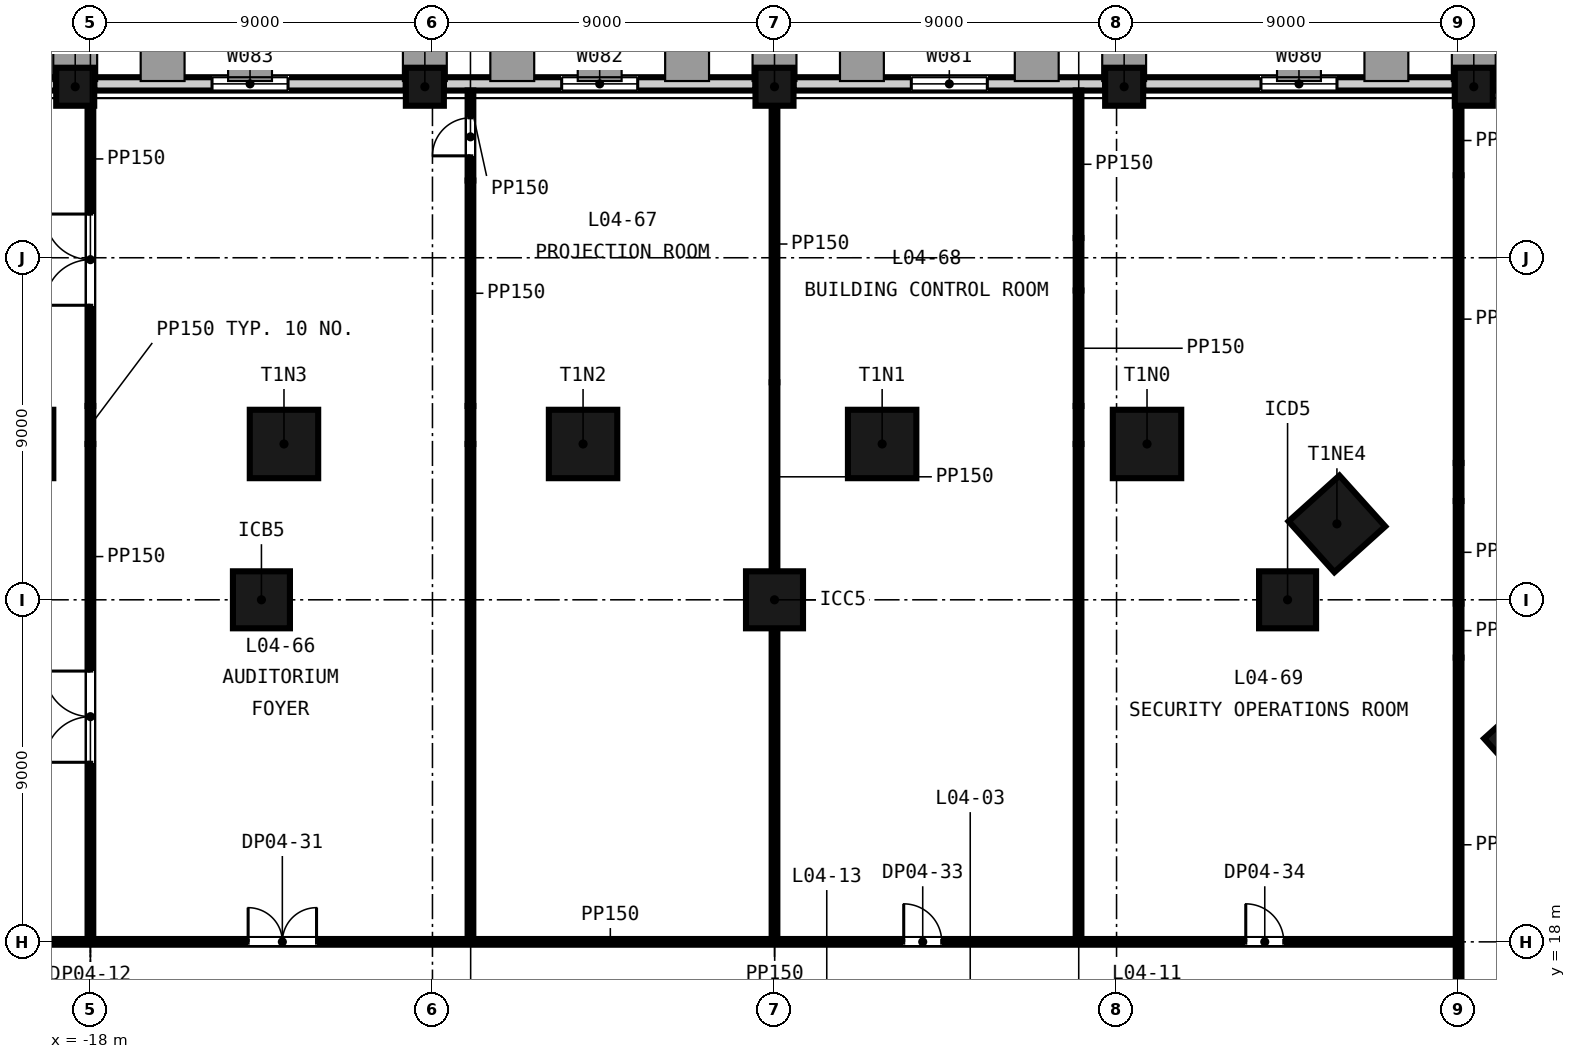
"""IFC4 building model, lengths in metres.
Left out: names, types, materials, properties, quantities, classifications, styles, units other than length and angle.
Written with IfcOpenShell. Run it as: python <this file> out.ifc"""

import sys

from ifc_helpers import new_model, si_unit, direction, frame, frame_2d, origin, origin_2d, place, context, subcontext, project, spatial, rectangle, extrude, element, fill, save


model = new_model("IFC4")
c1 = context("Model", 3, precision=1e-05, world=origin(), true_north=direction((0.0, 1.0)))
c2 = subcontext(c1, "Body", "Model", "MODEL_VIEW")
j1 = project(units=[si_unit("LENGTHUNIT", "METRE"), si_unit("PLANEANGLEUNIT", "RADIAN")], contexts=[c1])
p1 = place(None, origin())
s1 = spatial("IfcSite", under=j1, at=p1, CompositionType="ELEMENT")
p2 = place(p1, origin())
s2 = spatial("IfcBuilding", under=s1, at=p2, CompositionType="ELEMENT")
p3 = place(p2, frame((0.0, 0.0, 27.0)))
s3 = spatial("IfcBuildingStorey", under=s2, at=p3, CompositionType="ELEMENT", Elevation=27.0)
for number, where, z_axis, x_axis in (
    (1, (9.802, 31.1, -0.3), (0.0, 0.0, 1.0), (-1.0, 0.0, 0.0)),
    (2, (2.832, 31.1, -0.3), (0.0, 0.0, 1.0), (-1.0, 0.0, 0.0)),
    (3, (-5.037, 31.1, -0.3), (0.0, 0.0, 1.0), (-1.0, 0.0, 0.0)),
    (4, (-12.907, 31.1, -0.3), (0.0, 0.0, 1.0), (-1.0, 0.0, 0.0)),
    (5, (-19.876, 31.1, -0.3), (0.0, 0.0, 1.0), (-1.0, 0.0, 0.0)),
    (6, (19.944, 23.283, -0.3), (0.0, 0.0, 1.0), (-0.669, 0.743, 0.0)),
    (7, (14.799, 28.998, -0.3), (0.0, 0.0, 1.0), (-0.669, 0.743, 0.0)),
):
    element("IfcColumn", number, at=place(p3, frame(where, z_axis=z_axis, x_axis=x_axis)), inside=s3, PredefinedType="COLUMN", context=c2, shape_type="SweptSolid", body=[
        extrude(rectangle(XDim=1.8, YDim=1.8, at=origin_2d()), origin(), (0.0, 0.0, 1.0), 4.5),
    ])
for number, where, z_axis, x_axis in (
    (8, (-13.5, 27.0, -0.3), (0.0, 0.0, 1.0), (1.0, 0.0, 0.0)),
    (9, (0.0, 27.0, -0.3), (0.0, 0.0, 1.0), (1.0, 0.0, 0.0)),
    (10, (13.5, 27.0, -0.3), (0.0, 0.0, 1.0), (1.0, 0.0, 0.0)),
):
    element("IfcColumn", number, at=place(p3, frame(where, z_axis=z_axis, x_axis=x_axis)), inside=s3, PredefinedType="COLUMN", context=c2, shape_type="SweptSolid", body=[
        extrude(rectangle(XDim=1.5, YDim=1.5, at=origin_2d()), origin(), (0.0, 0.0, 1.0), 4.5),
    ])
for number, where, z_axis, x_axis in (
    (11, (18.4, 40.5, -0.3), (0.0, 0.0, 1.0), (-1.0, 0.0, 0.0)),
    (12, (9.2, 40.5, -0.3), (0.0, 0.0, 1.0), (-1.0, 0.0, 0.0)),
    (13, (0.0, 40.5, -0.3), (0.0, 0.0, 1.0), (-1.0, 0.0, 0.0)),
    (14, (-9.2, 40.5, -0.3), (0.0, 0.0, 1.0), (-1.0, 0.0, 0.0)),
    (15, (-18.4, 40.5, -0.3), (0.0, 0.0, 1.0), (-1.0, 0.0, 0.0)),
):
    element("IfcColumn", number, at=place(p3, frame(where, z_axis=z_axis, x_axis=x_axis)), inside=s3, PredefinedType="COLUMN", context=c2, shape_type="SweptSolid", body=[
        extrude(rectangle(XDim=1.0, YDim=1.0, at=origin_2d()), origin(), (0.0, 0.0, 1.0), 4.5),
    ])
p4 = place(p3, frame((27.1, 40.575, -0.3), z_axis=(0.0, 0.0, 1.0), x_axis=(-1.0, 0.0, 0.0)))
e16 = element("IfcWall", 16, at=p4, inside=s3, PredefinedType="SOLIDWALL", context=c2, shape_type="SweptSolid", body=[
    extrude(rectangle(XDim=8.2, YDim=0.35, at=frame_2d((4.1, 0.0))), origin(), (0.0, 0.0, 1.0), 3.6),
])
p5 = place(p4, frame((3.1, 0.0, 1.2)))
e17 = element("IfcOpeningElement", 17, at=p5, cuts=e16, PredefinedType="OPENING", context=c2, shape_type="SweptSolid", body=[
    extrude(rectangle(XDim=2.0, YDim=2.35, at=frame_2d((1.0, 1.175))), frame((0.0, 0.185, 0.0), z_axis=(0.0, -1.0, 0.0), x_axis=(1.0, 0.0, 0.0)), (0.0, 0.0, 1.0), 0.37),
])
p6 = place(p3, frame((17.9, 40.575, -0.3), z_axis=(0.0, 0.0, 1.0), x_axis=(-1.0, 0.0, 0.0)))
e18 = element("IfcWall", 18, at=p6, inside=s3, PredefinedType="SOLIDWALL", context=c2, shape_type="SweptSolid", body=[
    extrude(rectangle(XDim=8.2, YDim=0.35, at=frame_2d((4.1, 0.0))), origin(), (0.0, 0.0, 1.0), 3.6),
])
p7 = place(p6, frame((3.1, 0.0, 1.2)))
e19 = element("IfcOpeningElement", 19, at=p7, cuts=e18, PredefinedType="OPENING", context=c2, shape_type="SweptSolid", body=[
    extrude(rectangle(XDim=2.0, YDim=2.35, at=frame_2d((1.0, 1.175))), frame((0.0, 0.185, 0.0), z_axis=(0.0, -1.0, 0.0), x_axis=(1.0, 0.0, 0.0)), (0.0, 0.0, 1.0), 0.37),
])
p8 = place(p3, frame((8.7, 40.575, -0.3), z_axis=(0.0, 0.0, 1.0), x_axis=(-1.0, 0.0, 0.0)))
e20 = element("IfcWall", 20, at=p8, inside=s3, PredefinedType="SOLIDWALL", context=c2, shape_type="SweptSolid", body=[
    extrude(rectangle(XDim=8.2, YDim=0.35, at=frame_2d((4.1, 0.0))), origin(), (0.0, 0.0, 1.0), 3.6),
])
p9 = place(p8, frame((3.1, 0.0, 1.2)))
e21 = element("IfcOpeningElement", 21, at=p9, cuts=e20, PredefinedType="OPENING", context=c2, shape_type="SweptSolid", body=[
    extrude(rectangle(XDim=2.0, YDim=2.35, at=frame_2d((1.0, 1.175))), frame((0.0, 0.185, 0.0), z_axis=(0.0, -1.0, 0.0), x_axis=(1.0, 0.0, 0.0)), (0.0, 0.0, 1.0), 0.37),
])
p10 = place(p3, frame((-0.5, 40.575, -0.3), z_axis=(0.0, 0.0, 1.0), x_axis=(-1.0, 0.0, 0.0)))
e22 = element("IfcWall", 22, at=p10, inside=s3, PredefinedType="SOLIDWALL", context=c2, shape_type="SweptSolid", body=[
    extrude(rectangle(XDim=8.2, YDim=0.35, at=frame_2d((4.1, 0.0))), origin(), (0.0, 0.0, 1.0), 3.6),
])
p11 = place(p10, frame((3.1, 0.0, 1.2)))
e23 = element("IfcOpeningElement", 23, at=p11, cuts=e22, PredefinedType="OPENING", context=c2, shape_type="SweptSolid", body=[
    extrude(rectangle(XDim=2.0, YDim=2.35, at=frame_2d((1.0, 1.175))), frame((0.0, 0.185, 0.0), z_axis=(0.0, -1.0, 0.0), x_axis=(1.0, 0.0, 0.0)), (0.0, 0.0, 1.0), 0.37),
])
p12 = place(p3, frame((-9.7, 40.575, -0.3), z_axis=(0.0, 0.0, 1.0), x_axis=(-1.0, 0.0, 0.0)))
e24 = element("IfcWall", 24, at=p12, inside=s3, PredefinedType="SOLIDWALL", context=c2, shape_type="SweptSolid", body=[
    extrude(rectangle(XDim=8.2, YDim=0.35, at=frame_2d((4.1, 0.0))), origin(), (0.0, 0.0, 1.0), 3.6),
])
p13 = place(p12, frame((3.1, 0.0, 1.2)))
e25 = element("IfcOpeningElement", 25, at=p13, cuts=e24, PredefinedType="OPENING", context=c2, shape_type="SweptSolid", body=[
    extrude(rectangle(XDim=2.0, YDim=2.35, at=frame_2d((1.0, 1.175))), frame((0.0, 0.185, 0.0), z_axis=(0.0, -1.0, 0.0), x_axis=(1.0, 0.0, 0.0)), (0.0, 0.0, 1.0), 0.37),
])
p14 = place(p3, frame((-18.9, 40.575, -0.3), z_axis=(0.0, 0.0, 1.0), x_axis=(-1.0, 0.0, 0.0)))
e26 = element("IfcWall", 26, at=p14, inside=s3, PredefinedType="SOLIDWALL", context=c2, shape_type="SweptSolid", body=[
    extrude(rectangle(XDim=8.2, YDim=0.35, at=frame_2d((4.1, 0.0))), origin(), (0.0, 0.0, 1.0), 3.6),
])
p15 = place(p14, frame((3.1, 0.0, 1.2)))
e27 = element("IfcOpeningElement", 27, at=p15, cuts=e26, PredefinedType="OPENING", context=c2, shape_type="SweptSolid", body=[
    extrude(rectangle(XDim=2.0, YDim=2.35, at=frame_2d((1.0, 1.175))), frame((0.0, 0.185, 0.0), z_axis=(0.0, -1.0, 0.0), x_axis=(1.0, 0.0, 0.0)), (0.0, 0.0, 1.0), 0.37),
])
p16 = place(p3, frame((-26.142, 18.0, 0.0), z_axis=(0.0, 0.0, 1.0), x_axis=(1.0, 0.0, 0.0)))
e28 = element("IfcWall", 28, at=p16, inside=s3, PredefinedType="PARTITIONING", context=c2, shape_type="SweptSolid", body=[
    extrude(rectangle(XDim=44.067, YDim=0.15, at=frame_2d((22.034, 0.0))), origin(), (0.0, 0.0, 1.0), 4.2),
])
p17 = place(p16, frame((0.15, 0.0, 0.0)))
e29 = element("IfcOpeningElement", 29, at=p17, cuts=e28, PredefinedType="OPENING", context=c2, shape_type="SweptSolid", body=[
    extrude(rectangle(XDim=1.8, YDim=2.4, at=frame_2d((0.9, 1.2))), frame((0.0, 0.085, 0.0), z_axis=(0.0, -1.0, 0.0), x_axis=(1.0, 0.0, 0.0)), (0.0, 0.0, 1.0), 0.17),
])
p18 = place(p16, frame((12.292, 0.0, 0.0)))
e30 = element("IfcOpeningElement", 30, at=p18, cuts=e28, PredefinedType="OPENING", context=c2, shape_type="SweptSolid", body=[
    extrude(rectangle(XDim=1.8, YDim=2.4, at=frame_2d((0.9, 1.2))), frame((0.0, 0.085, 0.0), z_axis=(0.0, -1.0, 0.0), x_axis=(1.0, 0.0, 0.0)), (0.0, 0.0, 1.0), 0.17),
])
p19 = place(p16, frame((29.542, 0.0, 0.0)))
e31 = element("IfcOpeningElement", 31, at=p19, cuts=e28, PredefinedType="OPENING", context=c2, shape_type="SweptSolid", body=[
    extrude(rectangle(XDim=1.0, YDim=2.1, at=frame_2d((0.5, 1.05))), frame((0.0, 0.085, 0.0), z_axis=(0.0, -1.0, 0.0), x_axis=(1.0, 0.0, 0.0)), (0.0, 0.0, 1.0), 0.17),
])
p20 = place(p16, frame((38.542, 0.0, 0.0)))
e32 = element("IfcOpeningElement", 32, at=p20, cuts=e28, PredefinedType="OPENING", context=c2, shape_type="SweptSolid", body=[
    extrude(rectangle(XDim=1.0, YDim=2.1, at=frame_2d((0.5, 1.05))), frame((0.0, 0.085, 0.0), z_axis=(0.0, -1.0, 0.0), x_axis=(1.0, 0.0, 0.0)), (0.0, 0.0, 1.0), 0.17),
])
p21 = place(p3, frame((-18.0, 18.075, 0.0), z_axis=(0.0, 0.0, 1.0), x_axis=(0.0, 1.0, 0.0)))
e33 = element("IfcWall", 33, at=p21, inside=s3, PredefinedType="PARTITIONING", context=c2, shape_type="SweptSolid", body=[
    extrude(rectangle(XDim=13.025, YDim=0.15, at=frame_2d((6.513, 0.0))), origin(), (0.0, 0.0, 1.0), 4.2),
])
p22 = place(p21, frame((4.65, 0.0, 0.0)))
e34 = element("IfcOpeningElement", 34, at=p22, cuts=e33, PredefinedType="OPENING", context=c2, shape_type="SweptSolid", body=[
    extrude(rectangle(XDim=2.4, YDim=2.4, at=frame_2d((1.2, 1.2))), frame((0.0, 0.085, 0.0), z_axis=(0.0, -1.0, 0.0), x_axis=(1.0, 0.0, 0.0)), (0.0, 0.0, 1.0), 0.17),
])
p23 = place(p3, frame((-18.0, 31.1, 0.0), z_axis=(0.0, 0.0, 1.0), x_axis=(0.0, 1.0, 0.0)))
e35 = element("IfcWall", 35, at=p23, inside=s3, PredefinedType="PARTITIONING", context=c2, shape_type="SweptSolid", body=[
    extrude(rectangle(XDim=1.0, YDim=0.15, at=frame_2d((0.5, 0.0))), origin(), (0.0, 0.0, 1.0), 3.2),
])
p24 = place(p3, frame((-18.0, 32.1, 0.0), z_axis=(0.0, 0.0, 1.0), x_axis=(0.0, 1.0, 0.0)))
e36 = element("IfcWall", 36, at=p24, inside=s3, PredefinedType="PARTITIONING", context=c2, shape_type="SweptSolid", body=[
    extrude(rectangle(XDim=7.9, YDim=0.15, at=frame_2d((3.95, 0.0))), origin(), (0.0, 0.0, 1.0), 4.2),
])
p25 = place(p24, frame((2.65, 0.0, 0.0)))
e37 = element("IfcOpeningElement", 37, at=p25, cuts=e36, PredefinedType="OPENING", context=c2, shape_type="SweptSolid", body=[
    extrude(rectangle(XDim=2.4, YDim=2.4, at=frame_2d((1.2, 1.2))), frame((0.0, 0.085, 0.0), z_axis=(0.0, -1.0, 0.0), x_axis=(1.0, 0.0, 0.0)), (0.0, 0.0, 1.0), 0.17),
])
p26 = place(p3, frame((-8.0, 18.075, 0.0), z_axis=(0.0, 0.0, 1.0), x_axis=(0.0, 1.0, 0.0)))
e38 = element("IfcWall", 38, at=p26, inside=s3, PredefinedType="PARTITIONING", context=c2, shape_type="SweptSolid", body=[
    extrude(rectangle(XDim=13.025, YDim=0.15, at=frame_2d((6.513, 0.0))), origin(), (0.0, 0.0, 1.0), 4.2),
])
p27 = place(p3, frame((-8.0, 31.1, 0.0), z_axis=(0.0, 0.0, 1.0), x_axis=(0.0, 1.0, 0.0)))
e39 = element("IfcWall", 39, at=p27, inside=s3, PredefinedType="PARTITIONING", context=c2, shape_type="SweptSolid", body=[
    extrude(rectangle(XDim=1.0, YDim=0.15, at=frame_2d((0.5, 0.0))), origin(), (0.0, 0.0, 1.0), 3.2),
])
p28 = place(p3, frame((-8.0, 32.1, 0.0), z_axis=(0.0, 0.0, 1.0), x_axis=(0.0, 1.0, 0.0)))
e40 = element("IfcWall", 40, at=p28, inside=s3, PredefinedType="PARTITIONING", context=c2, shape_type="SweptSolid", body=[
    extrude(rectangle(XDim=5.931, YDim=0.15, at=frame_2d((2.966, 0.0))), origin(), (0.0, 0.0, 1.0), 4.2),
])
p29 = place(p3, frame((-8.0, 38.031, 0.0), z_axis=(0.0, 0.0, 1.0), x_axis=(0.0, 1.0, 0.0)))
e41 = element("IfcWall", 41, at=p29, inside=s3, PredefinedType="PARTITIONING", context=c2, shape_type="SweptSolid", body=[
    extrude(rectangle(XDim=2.368, YDim=0.15, at=frame_2d((1.184, 0.0))), origin(), (0.0, 0.0, 1.0), 3.6),
])
p30 = place(p29, frame((0.65, 0.0, 0.0)))
e42 = element("IfcOpeningElement", 42, at=p30, cuts=e41, PredefinedType="OPENING", context=c2, shape_type="SweptSolid", body=[
    extrude(rectangle(XDim=1.0, YDim=2.1, at=frame_2d((0.5, 1.05))), frame((0.0, 0.085, 0.0), z_axis=(0.0, -1.0, 0.0), x_axis=(1.0, 0.0, 0.0)), (0.0, 0.0, 1.0), 0.17),
])
p31 = place(p3, frame((0.0, 18.075, 0.0), z_axis=(0.0, 0.0, 1.0), x_axis=(0.0, 1.0, 0.0)))
e43 = element("IfcWall", 43, at=p31, inside=s3, PredefinedType="PARTITIONING", context=c2, shape_type="SweptSolid", body=[
    extrude(rectangle(XDim=8.175, YDim=0.15, at=frame_2d((4.087, 0.0))), origin(), (0.0, 0.0, 1.0), 3.521),
])
p32 = place(p3, frame((0.0, 27.75, 0.0), z_axis=(0.0, 0.0, 1.0), x_axis=(0.0, 1.0, 0.0)))
e44 = element("IfcWall", 44, at=p32, inside=s3, PredefinedType="PARTITIONING", context=c2, shape_type="SweptSolid", body=[
    extrude(rectangle(XDim=4.973, YDim=0.15, at=frame_2d((2.486, 0.0))), origin(), (0.0, 0.0, 1.0), 3.2),
])
p33 = place(p3, frame((0.0, 32.723, 0.0), z_axis=(0.0, 0.0, 1.0), x_axis=(0.0, 1.0, 0.0)))
e45 = element("IfcWall", 45, at=p33, inside=s3, PredefinedType="PARTITIONING", context=c2, shape_type="SweptSolid", body=[
    extrude(rectangle(XDim=7.277, YDim=0.15, at=frame_2d((3.639, 0.0))), origin(), (0.0, 0.0, 1.0), 4.2),
])
p34 = place(p3, frame((8.0, 18.075, 0.0), z_axis=(0.0, 0.0, 1.0), x_axis=(0.0, 1.0, 0.0)))
e46 = element("IfcWall", 46, at=p34, inside=s3, PredefinedType="PARTITIONING", context=c2, shape_type="SweptSolid", body=[
    extrude(rectangle(XDim=13.025, YDim=0.15, at=frame_2d((6.513, 0.0))), origin(), (0.0, 0.0, 1.0), 4.2),
])
p35 = place(p3, frame((8.0, 31.1, 0.0), z_axis=(0.0, 0.0, 1.0), x_axis=(0.0, 1.0, 0.0)))
e47 = element("IfcWall", 47, at=p35, inside=s3, PredefinedType="PARTITIONING", context=c2, shape_type="SweptSolid", body=[
    extrude(rectangle(XDim=1.0, YDim=0.15, at=frame_2d((0.5, 0.0))), origin(), (0.0, 0.0, 1.0), 3.2),
])
p36 = place(p3, frame((8.0, 32.1, 0.0), z_axis=(0.0, 0.0, 1.0), x_axis=(0.0, 1.0, 0.0)))
e48 = element("IfcWall", 48, at=p36, inside=s3, PredefinedType="PARTITIONING", context=c2, shape_type="SweptSolid", body=[
    extrude(rectangle(XDim=3.038, YDim=0.15, at=frame_2d((1.519, 0.0))), origin(), (0.0, 0.0, 1.0), 4.2),
])
p37 = place(p3, frame((8.0, 35.138, 0.0), z_axis=(0.0, 0.0, 1.0), x_axis=(0.0, 1.0, 0.0)))
e49 = element("IfcWall", 49, at=p37, inside=s3, PredefinedType="PARTITIONING", context=c2, shape_type="SweptSolid", body=[
    extrude(rectangle(XDim=1.381, YDim=0.15, at=frame_2d((0.69, 0.0))), origin(), (0.0, 0.0, 1.0), 3.6),
])
p38 = place(p3, frame((8.0, 36.519, 0.0), z_axis=(0.0, 0.0, 1.0), x_axis=(0.0, 1.0, 0.0)))
e50 = element("IfcWall", 50, at=p38, inside=s3, PredefinedType="PARTITIONING", context=c2, shape_type="SweptSolid", body=[
    extrude(rectangle(XDim=3.881, YDim=0.15, at=frame_2d((1.94, 0.0))), origin(), (0.0, 0.0, 1.0), 4.2),
])
p39 = place(p3, frame((18.0, 15.629, 0.0), z_axis=(0.0, 0.0, 1.0), x_axis=(0.0, 1.0, 0.0)))
e51 = element("IfcWall", 51, at=p39, inside=s3, PredefinedType="PARTITIONING", context=c2, shape_type="SweptSolid", body=[
    extrude(rectangle(XDim=9.85, YDim=0.15, at=frame_2d((4.925, 0.0))), origin(), (0.0, 0.0, 1.0), 4.2),
])
p40 = place(p3, frame((18.0, 25.479, 0.0), z_axis=(0.0, 0.0, 1.0), x_axis=(0.0, 1.0, 0.0)))
e52 = element("IfcWall", 52, at=p40, inside=s3, PredefinedType="PARTITIONING", context=c2, shape_type="SweptSolid", body=[
    extrude(rectangle(XDim=1.42, YDim=0.15, at=frame_2d((0.71, 0.0))), origin(), (0.0, 0.0, 1.0), 3.2),
])
p41 = place(p3, frame((18.0, 26.899, 0.0), z_axis=(0.0, 0.0, 1.0), x_axis=(0.0, 1.0, 0.0)))
e53 = element("IfcWall", 53, at=p41, inside=s3, PredefinedType="PARTITIONING", context=c2, shape_type="SweptSolid", body=[
    extrude(rectangle(XDim=2.701, YDim=0.15, at=frame_2d((1.35, 0.0))), origin(), (0.0, 0.0, 1.0), 4.2),
])
p42 = place(p3, frame((18.0, 29.6, 0.0), z_axis=(0.0, 0.0, 1.0), x_axis=(0.0, 1.0, 0.0)))
e54 = element("IfcWall", 54, at=p42, inside=s3, PredefinedType="PARTITIONING", context=c2, shape_type="SweptSolid", body=[
    extrude(rectangle(XDim=1.0, YDim=0.15, at=frame_2d((0.5, 0.0))), origin(), (0.0, 0.0, 1.0), 3.441),
])
p43 = place(p3, frame((18.0, 30.6, 0.0), z_axis=(0.0, 0.0, 1.0), x_axis=(0.0, 1.0, 0.0)))
e55 = element("IfcWall", 55, at=p43, inside=s3, PredefinedType="PARTITIONING", context=c2, shape_type="SweptSolid", body=[
    extrude(rectangle(XDim=7.57, YDim=0.15, at=frame_2d((3.785, 0.0))), origin(), (0.0, 0.0, 1.0), 4.2),
])
p44 = place(p3, frame((18.0, 38.17, 0.0), z_axis=(0.0, 0.0, 1.0), x_axis=(0.0, 1.0, 0.0)))
e56 = element("IfcWall", 56, at=p44, inside=s3, PredefinedType="PARTITIONING", context=c2, shape_type="SweptSolid", body=[
    extrude(rectangle(XDim=1.83, YDim=0.15, at=frame_2d((0.915, 0.0))), origin(), (0.0, 0.0, 1.0), 3.521),
])
p45 = place(p7, origin())
e57 = element("IfcWindow", 57, at=p45, inside=s3, PartitioningType="SINGLE_PANEL", PredefinedType="WINDOW", context=c2, shape_type="SweptSolid", body=[
    extrude(rectangle(XDim=2.0, YDim=2.35, at=frame_2d((1.0, 1.175))), frame((0.0, 0.03, 0.0), z_axis=(0.0, -1.0, 0.0), x_axis=(1.0, 0.0, 0.0)), (0.0, 0.0, 1.0), 0.06),
])
fill(e19, e57)
p46 = place(p9, origin())
e58 = element("IfcWindow", 58, at=p46, inside=s3, PartitioningType="SINGLE_PANEL", PredefinedType="WINDOW", context=c2, shape_type="SweptSolid", body=[
    extrude(rectangle(XDim=2.0, YDim=2.35, at=frame_2d((1.0, 1.175))), frame((0.0, 0.03, 0.0), z_axis=(0.0, -1.0, 0.0), x_axis=(1.0, 0.0, 0.0)), (0.0, 0.0, 1.0), 0.06),
])
fill(e21, e58)
p47 = place(p11, origin())
e59 = element("IfcWindow", 59, at=p47, inside=s3, PartitioningType="SINGLE_PANEL", PredefinedType="WINDOW", context=c2, shape_type="SweptSolid", body=[
    extrude(rectangle(XDim=2.0, YDim=2.35, at=frame_2d((1.0, 1.175))), frame((0.0, 0.03, 0.0), z_axis=(0.0, -1.0, 0.0), x_axis=(1.0, 0.0, 0.0)), (0.0, 0.0, 1.0), 0.06),
])
fill(e23, e59)
p48 = place(p13, origin())
e60 = element("IfcWindow", 60, at=p48, inside=s3, PartitioningType="SINGLE_PANEL", PredefinedType="WINDOW", context=c2, shape_type="SweptSolid", body=[
    extrude(rectangle(XDim=2.0, YDim=2.35, at=frame_2d((1.0, 1.175))), frame((0.0, 0.03, 0.0), z_axis=(0.0, -1.0, 0.0), x_axis=(1.0, 0.0, 0.0)), (0.0, 0.0, 1.0), 0.06),
])
fill(e25, e60)
p49 = place(p22, origin())
e61 = element("IfcDoor", 61, at=p49, inside=s3, OperationType="SINGLE_SWING_LEFT", PredefinedType="DOOR", context=c2, shape_type="SweptSolid", body=[
    extrude(rectangle(XDim=2.4, YDim=2.4, at=frame_2d((1.2, 1.2))), frame((0.0, 0.025, 0.0), z_axis=(0.0, -1.0, 0.0), x_axis=(1.0, 0.0, 0.0)), (0.0, 0.0, 1.0), 0.05),
])
fill(e34, e61)
p50 = place(p25, origin())
e62 = element("IfcDoor", 62, at=p50, inside=s3, OperationType="SINGLE_SWING_LEFT", PredefinedType="DOOR", context=c2, shape_type="SweptSolid", body=[
    extrude(rectangle(XDim=2.4, YDim=2.4, at=frame_2d((1.2, 1.2))), frame((0.0, 0.025, 0.0), z_axis=(0.0, -1.0, 0.0), x_axis=(1.0, 0.0, 0.0)), (0.0, 0.0, 1.0), 0.05),
])
fill(e37, e62)
p51 = place(p18, origin())
e63 = element("IfcDoor", 63, at=p51, inside=s3, OperationType="SINGLE_SWING_LEFT", PredefinedType="DOOR", context=c2, shape_type="SweptSolid", body=[
    extrude(rectangle(XDim=1.8, YDim=2.4, at=frame_2d((0.9, 1.2))), frame((0.0, 0.025, 0.0), z_axis=(0.0, -1.0, 0.0), x_axis=(1.0, 0.0, 0.0)), (0.0, 0.0, 1.0), 0.05),
])
fill(e30, e63)
p52 = place(p30, origin())
e64 = element("IfcDoor", 64, at=p52, inside=s3, OperationType="SINGLE_SWING_LEFT", PredefinedType="DOOR", context=c2, shape_type="SweptSolid", body=[
    extrude(rectangle(XDim=1.0, YDim=2.1, at=frame_2d((0.5, 1.05))), frame((0.0, 0.025, 0.0), z_axis=(0.0, -1.0, 0.0), x_axis=(1.0, 0.0, 0.0)), (0.0, 0.0, 1.0), 0.05),
])
fill(e42, e64)
p53 = place(p19, origin())
e65 = element("IfcDoor", 65, at=p53, inside=s3, OperationType="SINGLE_SWING_LEFT", PredefinedType="DOOR", context=c2, shape_type="SweptSolid", body=[
    extrude(rectangle(XDim=1.0, YDim=2.1, at=frame_2d((0.5, 1.05))), frame((0.0, 0.025, 0.0), z_axis=(0.0, -1.0, 0.0), x_axis=(1.0, 0.0, 0.0)), (0.0, 0.0, 1.0), 0.05),
])
fill(e31, e65)
p54 = place(p20, origin())
e66 = element("IfcDoor", 66, at=p54, inside=s3, OperationType="SINGLE_SWING_LEFT", PredefinedType="DOOR", context=c2, shape_type="SweptSolid", body=[
    extrude(rectangle(XDim=1.0, YDim=2.1, at=frame_2d((0.5, 1.05))), frame((0.0, 0.025, 0.0), z_axis=(0.0, -1.0, 0.0), x_axis=(1.0, 0.0, 0.0)), (0.0, 0.0, 1.0), 0.05),
])
fill(e32, e66)
save(model, sys.argv[1])
